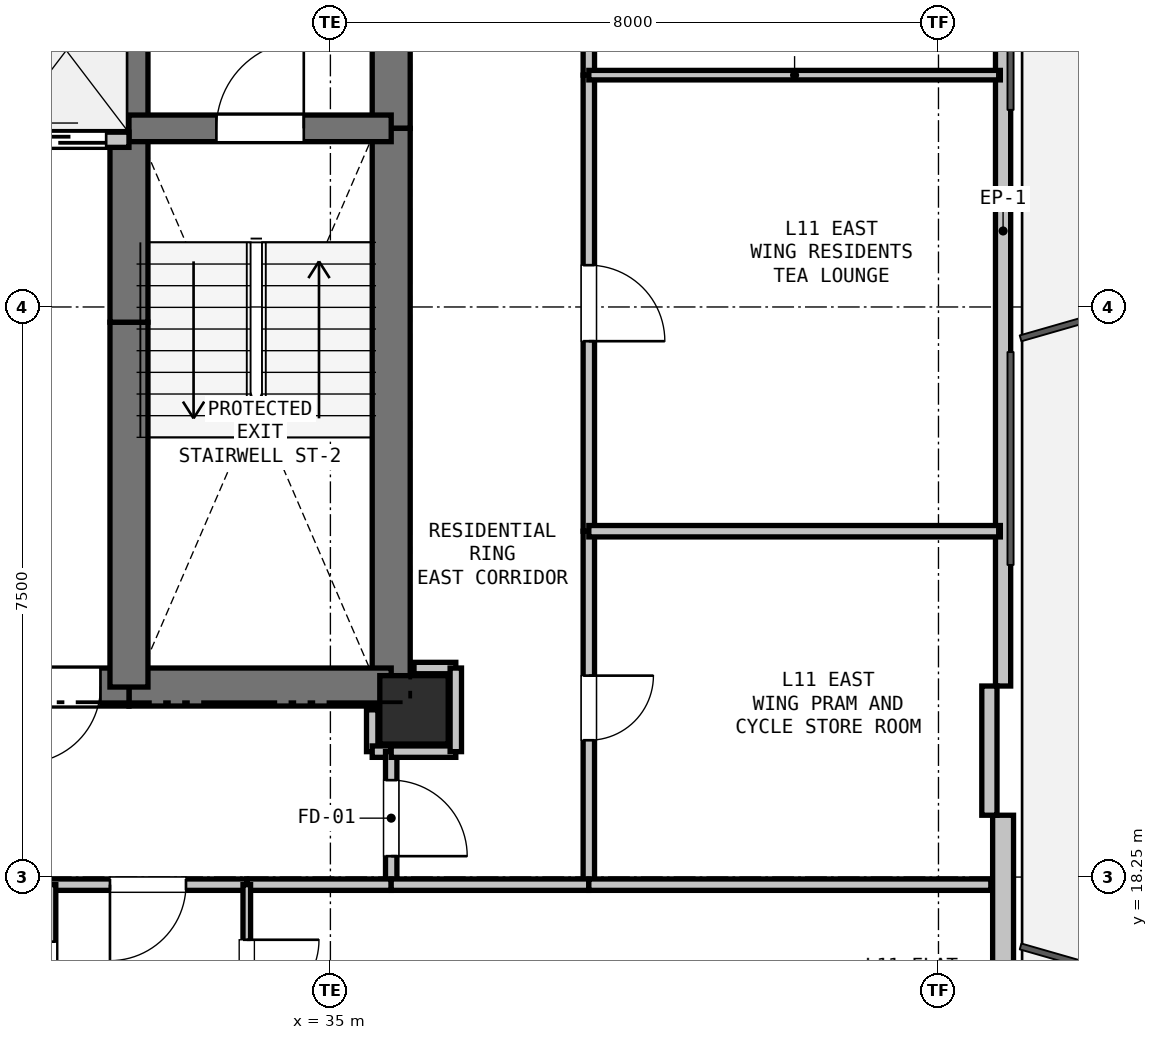
"""IFC4 building model, lengths in metres.
Left out: names, types, materials, properties, quantities, classifications, styles, units other than length and angle.
Written with IfcOpenShell. Run it as: python <this file> out.ifc"""

import sys

from ifc_helpers import new_model, si_unit, direction, frame, frame_2d, origin, origin_2d, place, context, subcontext, project, spatial, rectangle, extrude, element, fill, save


model = new_model("IFC4")
c1 = context("Model", 3, precision=1e-05, world=origin(), true_north=direction((0.0, 1.0)))
c2 = subcontext(c1, "Body", "Model", "MODEL_VIEW")
j1 = project(units=[si_unit("LENGTHUNIT", "METRE"), si_unit("PLANEANGLEUNIT", "RADIAN")], contexts=[c1])
p1 = place(None, origin())
s1 = spatial("IfcSite", under=j1, at=p1, CompositionType="ELEMENT")
p2 = place(p1, origin())
s2 = spatial("IfcBuilding", under=s1, at=p2, CompositionType="ELEMENT")
p3 = place(p2, frame((0.0, 0.0, 42.3)))
s3 = spatial("IfcBuildingStorey", under=s2, at=p3, CompositionType="ELEMENT", Elevation=42.3)
p4 = place(p3, frame((36.1, 20.45, 0.0), z_axis=(0.0, 0.0, 1.0), x_axis=(1.0, 0.0, 0.0)))
e1 = element("IfcColumn", 1, at=p4, inside=s3, PredefinedType="COLUMN", context=c2, shape_type="SweptSolid", body=[
    extrude(rectangle(XDim=0.9, YDim=0.9, at=origin_2d()), origin(), (0.0, 0.0, 1.0), 3.3),
])
p5 = place(p3, frame((43.85, 32.737, 0.0), z_axis=(0.0, 0.0, 1.0), x_axis=(0.0, -1.0, 0.0)))
e2 = element("IfcWall", 2, at=p5, inside=s3, PredefinedType="PARAPET", context=c2, shape_type="SweptSolid", body=[
    extrude(rectangle(XDim=11.973, YDim=0.2, at=frame_2d((5.987, 0.0))), origin(), (0.0, 0.0, 1.0), 0.2),
])
p6 = place(p3, frame((43.85, 19.063, 0.0), z_axis=(0.0, 0.0, 1.0), x_axis=(0.0, -1.0, 0.0)))
e3 = element("IfcWall", 3, at=p6, inside=s3, PredefinedType="SOLIDWALL", context=c2, shape_type="SweptSolid", body=[
    extrude(rectangle(XDim=12.673, YDim=0.275, at=frame_2d((6.336, 0.0))), origin(), (0.0, 0.0, 1.0), 2.66),
])
p7 = place(p3, frame((43.67, 20.763, 0.0), z_axis=(0.0, 0.0, 1.0), x_axis=(0.0, -1.0, 0.0)))
e4 = element("IfcWall", 4, at=p7, inside=s3, PredefinedType="PARAPET", context=c2, shape_type="SweptSolid", body=[
    extrude(rectangle(XDim=1.7, YDim=0.2, at=frame_2d((0.85, 0.0))), origin(), (0.0, 0.0, 1.0), 2.66),
])
p8 = place(p3, frame((35.8, 32.75, 0.0), z_axis=(0.0, 0.0, 1.0), x_axis=(0.0, -1.0, 0.0)))
e5 = element("IfcWall", 5, at=p8, inside=s3, PredefinedType="SHEAR", context=c2, shape_type="SweptSolid", body=[
    extrude(rectangle(XDim=4.65, YDim=0.5, at=frame_2d((2.325, 0.0))), origin(), (0.0, 0.0, 1.0), 3.04),
])
p9 = place(p3, frame((35.8, 28.1, 0.0), z_axis=(0.0, 0.0, 1.0), x_axis=(0.0, -1.0, 0.0)))
e6 = element("IfcWall", 6, at=p9, inside=s3, PredefinedType="SHEAR", context=c2, shape_type="SweptSolid", body=[
    extrude(rectangle(XDim=7.35, YDim=0.5, at=frame_2d((3.675, 0.0))), origin(), (0.0, 0.0, 1.0), 3.04),
])
p10 = place(p3, frame((35.8, 20.75, 0.0), z_axis=(0.0, 0.0, 1.0), x_axis=(-1.0, 0.0, 0.0)))
e7 = element("IfcWall", 7, at=p10, inside=s3, PredefinedType="SHEAR", context=c2, shape_type="SweptSolid", body=[
    extrude(rectangle(XDim=3.45, YDim=0.5, at=frame_2d((1.725, 0.0))), origin(), (0.0, 0.0, 1.0), 3.04),
])
p11 = place(p3, frame((32.35, 20.75, 0.0), z_axis=(0.0, 0.0, 1.0), x_axis=(-1.0, 0.0, 0.0)))
e8 = element("IfcWall", 8, at=p11, inside=s3, PredefinedType="SHEAR", context=c2, shape_type="SweptSolid", body=[
    extrude(rectangle(XDim=1.75, YDim=0.5, at=frame_2d((0.875, 0.0))), origin(), (0.0, 0.0, 1.0), 3.04),
])
p12 = place(p11, frame((0.375, 0.0, 0.0)))
e9 = element("IfcOpeningElement", 9, at=p12, cuts=e8, PredefinedType="OPENING", context=c2, shape_type="SweptSolid", body=[
    extrude(rectangle(XDim=1.0, YDim=2.15, at=frame_2d((0.5, 1.075))), frame((0.0, 0.26, 0.0), z_axis=(0.0, -1.0, 0.0), x_axis=(1.0, 0.0, 0.0)), (0.0, 0.0, 1.0), 0.52),
])
p13 = place(p3, frame((32.35, 20.75, 0.0), z_axis=(0.0, 0.0, 1.0), x_axis=(0.0, 1.0, 0.0)))
e10 = element("IfcWall", 10, at=p13, inside=s3, PredefinedType="SHEAR", context=c2, shape_type="SweptSolid", body=[
    extrude(rectangle(XDim=4.8, YDim=0.5, at=frame_2d((2.4, 0.0))), origin(), (0.0, 0.0, 1.0), 3.04),
])
p14 = place(p3, frame((32.35, 25.55, 0.0), z_axis=(0.0, 0.0, 1.0), x_axis=(0.0, 1.0, 0.0)))
e11 = element("IfcWall", 11, at=p14, inside=s3, PredefinedType="SHEAR", context=c2, shape_type="SweptSolid", body=[
    extrude(rectangle(XDim=2.4, YDim=0.5, at=frame_2d((1.2, 0.0))), origin(), (0.0, 0.0, 1.0), 3.04),
])
p15 = place(p3, frame((32.35, 27.95, 0.0), z_axis=(0.0, 0.0, 1.0), x_axis=(0.0, 1.0, 0.0)))
e12 = element("IfcWall", 12, at=p15, inside=s3, PredefinedType="SHEAR", context=c2, shape_type="SweptSolid", body=[
    extrude(rectangle(XDim=2.8, YDim=0.5, at=frame_2d((1.4, 0.0))), origin(), (0.0, 0.0, 1.0), 3.04),
])
p16 = place(p3, frame((32.35, 28.1, 0.0), z_axis=(0.0, 0.0, 1.0), x_axis=(1.0, 0.0, 0.0)))
e13 = element("IfcWall", 13, at=p16, inside=s3, PredefinedType="SHEAR", context=c2, shape_type="SweptSolid", body=[
    extrude(rectangle(XDim=3.45, YDim=0.35, at=frame_2d((1.725, 0.0))), origin(), (0.0, 0.0, 1.0), 3.04),
])
p17 = place(p16, frame((1.15, 0.0, 0.0)))
e14 = element("IfcOpeningElement", 14, at=p17, cuts=e13, PredefinedType="OPENING", context=c2, shape_type="SweptSolid", body=[
    extrude(rectangle(XDim=1.15, YDim=2.15, at=frame_2d((0.575, 1.075))), frame((0.0, 0.185, 0.0), z_axis=(0.0, -1.0, 0.0), x_axis=(1.0, 0.0, 0.0)), (0.0, 0.0, 1.0), 0.37),
])
p18 = place(p3, frame((27.4, 27.95, 0.0), z_axis=(0.0, 0.0, 1.0), x_axis=(1.0, 0.0, 0.0)))
e15 = element("IfcWall", 15, at=p18, inside=s3, PredefinedType="PARTITIONING", context=c2, shape_type="SweptSolid", body=[
    extrude(rectangle(XDim=4.95, YDim=0.2, at=frame_2d((2.475, 0.0))), origin(), (0.0, 0.0, 1.0), 3.04),
])
p19 = place(p18, frame((0.25, 0.0, 0.0)))
e16 = element("IfcOpeningElement", 16, at=p19, cuts=e15, PredefinedType="OPENING", context=c2, shape_type="SweptSolid", body=[
    extrude(rectangle(XDim=1.1, YDim=2.15, at=frame_2d((0.55, 1.075))), frame((0.0, 0.11, 0.0), z_axis=(0.0, -1.0, 0.0), x_axis=(1.0, 0.0, 0.0)), (0.0, 0.0, 1.0), 0.22),
])
p20 = place(p18, frame((1.9, 0.0, 0.0)))
e17 = element("IfcOpeningElement", 17, at=p20, cuts=e15, PredefinedType="OPENING", context=c2, shape_type="SweptSolid", body=[
    extrude(rectangle(XDim=1.1, YDim=2.15, at=frame_2d((0.55, 1.075))), frame((0.0, 0.11, 0.0), z_axis=(0.0, -1.0, 0.0), x_axis=(1.0, 0.0, 0.0)), (0.0, 0.0, 1.0), 0.22),
])
p21 = place(p18, frame((3.55, 0.0, 0.0)))
e18 = element("IfcOpeningElement", 18, at=p21, cuts=e15, PredefinedType="OPENING", context=c2, shape_type="SweptSolid", body=[
    extrude(rectangle(XDim=1.1, YDim=2.15, at=frame_2d((0.55, 1.075))), frame((0.0, 0.11, 0.0), z_axis=(0.0, -1.0, 0.0), x_axis=(1.0, 0.0, 0.0)), (0.0, 0.0, 1.0), 0.22),
])
p22 = place(p3, frame((35.55, 20.45, 0.0), z_axis=(0.0, 0.0, 1.0), x_axis=(0.0, -1.0, 0.0)))
e19 = element("IfcWall", 19, at=p22, inside=s3, PredefinedType="PARTITIONING", context=c2, shape_type="SweptSolid", body=[
    extrude(rectangle(XDim=0.55, YDim=0.15, at=frame_2d((0.275, 0.0))), origin(), (0.0, 0.0, 1.0), 2.488),
])
p23 = place(p3, frame((35.55, 19.9, 0.0), z_axis=(0.0, 0.0, 1.0), x_axis=(1.0, 0.0, 0.0)))
e20 = element("IfcWall", 20, at=p23, inside=s3, PredefinedType="PARTITIONING", context=c2, shape_type="SweptSolid", body=[
    extrude(rectangle(XDim=0.25, YDim=0.15, at=frame_2d((0.125, 0.0))), origin(), (0.0, 0.0, 1.0), 3.04),
])
p24 = place(p3, frame((35.8, 19.9, 0.0), z_axis=(0.0, 0.0, 1.0), x_axis=(0.0, -1.0, 0.0)))
e21 = element("IfcWall", 21, at=p24, inside=s3, PredefinedType="PARTITIONING", context=c2, shape_type="SweptSolid", body=[
    extrude(rectangle(XDim=1.75, YDim=0.15, at=frame_2d((0.875, 0.0))), origin(), (0.0, 0.0, 1.0), 3.04),
])
p25 = place(p24, frame((0.375, 0.0, 0.0)))
e22 = element("IfcOpeningElement", 22, at=p25, cuts=e21, PredefinedType="OPENING", context=c2, shape_type="SweptSolid", body=[
    extrude(rectangle(XDim=1.0, YDim=2.15, at=frame_2d((0.5, 1.075))), frame((0.0, 0.085, 0.0), z_axis=(0.0, -1.0, 0.0), x_axis=(1.0, 0.0, 0.0)), (0.0, 0.0, 1.0), 0.17),
])
p26 = place(p3, frame((35.8, 18.15, 0.0), z_axis=(0.0, 0.0, 1.0), x_axis=(-1.0, 0.0, 0.0)))
e23 = element("IfcWall", 23, at=p26, inside=s3, PredefinedType="PARTITIONING", context=c2, shape_type="SweptSolid", body=[
    extrude(rectangle(XDim=1.9, YDim=0.15, at=frame_2d((0.95, 0.0))), origin(), (0.0, 0.0, 1.0), 3.04),
])
p27 = place(p3, frame((33.9, 18.15, 0.0), z_axis=(0.0, 0.0, 1.0), x_axis=(-1.0, 0.0, 0.0)))
e24 = element("IfcWall", 24, at=p27, inside=s3, PredefinedType="PARTITIONING", context=c2, shape_type="SweptSolid", body=[
    extrude(rectangle(XDim=2.6, YDim=0.15, at=frame_2d((1.3, 0.0))), origin(), (0.0, 0.0, 1.0), 3.04),
])
p28 = place(p27, frame((0.8, 0.0, 0.0)))
e25 = element("IfcOpeningElement", 25, at=p28, cuts=e24, PredefinedType="OPENING", context=c2, shape_type="SweptSolid", body=[
    extrude(rectangle(XDim=1.0, YDim=2.15, at=frame_2d((0.5, 1.075))), frame((0.0, 0.085, 0.0), z_axis=(0.0, -1.0, 0.0), x_axis=(1.0, 0.0, 0.0)), (0.0, 0.0, 1.0), 0.17),
])
p29 = place(p3, frame((36.65, 21.0, 0.0), z_axis=(0.0, 0.0, 1.0), x_axis=(-1.0, 0.0, 0.0)))
e26 = element("IfcWall", 26, at=p29, inside=s3, PredefinedType="PARTITIONING", context=c2, shape_type="SweptSolid", body=[
    extrude(rectangle(XDim=0.55, YDim=0.15, at=frame_2d((0.275, 0.0))), origin(), (0.0, 0.0, 1.0), 2.488),
])
p30 = place(p3, frame((38.4, 32.08, 0.0), z_axis=(0.0, 0.0, 1.0), x_axis=(0.0, -1.0, 0.0)))
e27 = element("IfcWall", 27, at=p30, inside=s3, PredefinedType="PARTITIONING", context=c2, shape_type="SweptSolid", body=[
    extrude(rectangle(XDim=3.28, YDim=0.15, at=frame_2d((1.64, 0.0))), origin(), (0.0, 0.0, 1.0), 3.04),
])
p31 = place(p30, frame((1.14, 0.0, 0.0)))
e28 = element("IfcOpeningElement", 28, at=p31, cuts=e27, PredefinedType="OPENING", context=c2, shape_type="SweptSolid", body=[
    extrude(rectangle(XDim=1.0, YDim=2.15, at=frame_2d((0.5, 1.075))), frame((0.0, 0.085, 0.0), z_axis=(0.0, -1.0, 0.0), x_axis=(1.0, 0.0, 0.0)), (0.0, 0.0, 1.0), 0.17),
])
p32 = place(p3, frame((38.4, 28.8, 0.0), z_axis=(0.0, 0.0, 1.0), x_axis=(0.0, -1.0, 0.0)))
e29 = element("IfcWall", 29, at=p32, inside=s3, PredefinedType="PARTITIONING", context=c2, shape_type="SweptSolid", body=[
    extrude(rectangle(XDim=6.0, YDim=0.15, at=frame_2d((3.0, 0.0))), origin(), (0.0, 0.0, 1.0), 3.04),
])
p33 = place(p32, frame((2.5, 0.0, 0.0)))
e30 = element("IfcOpeningElement", 30, at=p33, cuts=e29, PredefinedType="OPENING", context=c2, shape_type="SweptSolid", body=[
    extrude(rectangle(XDim=1.0, YDim=2.15, at=frame_2d((0.5, 1.075))), frame((0.0, 0.085, 0.0), z_axis=(0.0, -1.0, 0.0), x_axis=(1.0, 0.0, 0.0)), (0.0, 0.0, 1.0), 0.17),
])
p34 = place(p3, frame((38.4, 22.8, 0.0), z_axis=(0.0, 0.0, 1.0), x_axis=(0.0, -1.0, 0.0)))
e31 = element("IfcWall", 31, at=p34, inside=s3, PredefinedType="PARTITIONING", context=c2, shape_type="SweptSolid", body=[
    extrude(rectangle(XDim=4.65, YDim=0.15, at=frame_2d((2.325, 0.0))), origin(), (0.0, 0.0, 1.0), 3.04),
])
p35 = place(p34, frame((1.9, 0.0, 0.0)))
e32 = element("IfcOpeningElement", 32, at=p35, cuts=e31, PredefinedType="OPENING", context=c2, shape_type="SweptSolid", body=[
    extrude(rectangle(XDim=0.85, YDim=2.1, at=frame_2d((0.425, 1.05))), frame((0.0, 0.085, 0.0), z_axis=(0.0, -1.0, 0.0), x_axis=(1.0, 0.0, 0.0)), (0.0, 0.0, 1.0), 0.17),
])
p36 = place(p3, frame((38.4, 18.15, 0.0), z_axis=(0.0, 0.0, 1.0), x_axis=(-1.0, 0.0, 0.0)))
e33 = element("IfcWall", 33, at=p36, inside=s3, PredefinedType="PARTITIONING", context=c2, shape_type="SweptSolid", body=[
    extrude(rectangle(XDim=2.6, YDim=0.15, at=frame_2d((1.3, 0.0))), origin(), (0.0, 0.0, 1.0), 2.337),
])
p37 = place(p3, frame((35.8, 19.9, 0.0), z_axis=(0.0, 0.0, 1.0), x_axis=(1.0, 0.0, 0.0)))
e34 = element("IfcWall", 34, at=p37, inside=s3, PredefinedType="PARTITIONING", context=c2, shape_type="SweptSolid", body=[
    extrude(rectangle(XDim=0.85, YDim=0.15, at=frame_2d((0.425, 0.0))), origin(), (0.0, 0.0, 1.0), 2.337),
])
p38 = place(p3, frame((36.65, 19.9, 0.0), z_axis=(0.0, 0.0, 1.0), x_axis=(0.0, 1.0, 0.0)))
e35 = element("IfcWall", 35, at=p38, inside=s3, PredefinedType="PARTITIONING", context=c2, shape_type="SweptSolid", body=[
    extrude(rectangle(XDim=1.1, YDim=0.15, at=frame_2d((0.55, 0.0))), origin(), (0.0, 0.0, 1.0), 3.04),
])
p39 = place(p3, frame((31.3, 15.75, 0.0), z_axis=(0.0, 0.0, 1.0), x_axis=(0.0, 1.0, 0.0)))
e36 = element("IfcWall", 36, at=p39, inside=s3, PredefinedType="PLUMBINGWALL", context=c2, shape_type="SweptSolid", body=[
    extrude(rectangle(XDim=2.4, YDim=0.175, at=frame_2d((1.2, 0.0))), origin(), (0.0, 0.0, 1.0), 3.04),
])
p40 = place(p39, frame((0.75, 0.0, 0.0)))
e37 = element("IfcOpeningElement", 37, at=p40, cuts=e36, PredefinedType="OPENING", context=c2, shape_type="SweptSolid", body=[
    extrude(rectangle(XDim=0.9, YDim=2.1, at=frame_2d((0.45, 1.05))), frame((0.0, 0.097, 0.0), z_axis=(0.0, -1.0, 0.0), x_axis=(1.0, 0.0, 0.0)), (0.0, 0.0, 1.0), 0.195),
])
p41 = place(p3, frame((33.9, 18.15, 0.0), z_axis=(0.0, 0.0, 1.0), x_axis=(0.0, -1.0, 0.0)))
e38 = element("IfcWall", 38, at=p41, inside=s3, PredefinedType="PARTITIONING", context=c2, shape_type="SweptSolid", body=[
    extrude(rectangle(XDim=2.4, YDim=0.1, at=frame_2d((1.2, 0.0))), origin(), (0.0, 0.0, 1.0), 3.04),
])
p42 = place(p41, frame((0.725, 0.0, 0.0)))
e39 = element("IfcOpeningElement", 39, at=p42, cuts=e38, PredefinedType="OPENING", context=c2, shape_type="SweptSolid", body=[
    extrude(rectangle(XDim=0.95, YDim=2.1, at=frame_2d((0.475, 1.05))), frame((0.0, 0.06, 0.0), z_axis=(0.0, -1.0, 0.0), x_axis=(1.0, 0.0, 0.0)), (0.0, 0.0, 1.0), 0.12),
])
p43 = place(p3, frame((38.4, 18.15, 0.0), z_axis=(0.0, 0.0, 1.0), x_axis=(1.0, 0.0, 0.0)))
e40 = element("IfcWall", 40, at=p43, inside=s3, PredefinedType="PARTITIONING", context=c2, shape_type="SweptSolid", body=[
    extrude(rectangle(XDim=5.289, YDim=0.15, at=frame_2d((2.644, 0.0))), origin(), (0.0, 0.0, 1.0), 2.365),
])
p44 = place(p3, frame((43.814, 28.8, 0.0), z_axis=(0.0, 0.0, 1.0), x_axis=(-1.0, 0.0, 0.0)))
e41 = element("IfcWall", 41, at=p44, inside=s3, PredefinedType="PARTITIONING", context=c2, shape_type="SweptSolid", body=[
    extrude(rectangle(XDim=5.414, YDim=0.125, at=frame_2d((2.707, 0.0))), origin(), (0.0, 0.0, 1.0), 2.365),
])
p45 = place(p3, frame((43.814, 22.8, 0.0), z_axis=(0.0, 0.0, 1.0), x_axis=(-1.0, 0.0, 0.0)))
e42 = element("IfcWall", 42, at=p45, inside=s3, PredefinedType="PARTITIONING", context=c2, shape_type="SweptSolid", body=[
    extrude(rectangle(XDim=5.414, YDim=0.15, at=frame_2d((2.707, 0.0))), origin(), (0.0, 0.0, 1.0), 2.365),
])
p46 = place(p21, origin())
e43 = element("IfcDoor", 43, at=p46, inside=s3, OperationType="SLIDING_TO_LEFT", PredefinedType="DOOR", context=c2, shape_type="SweptSolid", body=[
    extrude(rectangle(XDim=1.1, YDim=2.15, at=frame_2d((0.55, 1.075))), frame((0.0, 0.025, 0.0), z_axis=(0.0, -1.0, 0.0), x_axis=(1.0, 0.0, 0.0)), (0.0, 0.0, 1.0), 0.05),
])
fill(e18, e43)
p47 = place(p12, origin())
e44 = element("IfcDoor", 44, at=p47, inside=s3, OperationType="SINGLE_SWING_RIGHT", PredefinedType="DOOR", context=c2, shape_type="SweptSolid", body=[
    extrude(rectangle(XDim=1.0, YDim=2.15, at=frame_2d((0.5, 1.075))), frame((0.0, 0.025, 0.0), z_axis=(0.0, -1.0, 0.0), x_axis=(1.0, 0.0, 0.0)), (0.0, 0.0, 1.0), 0.05),
])
fill(e9, e44)
p48 = place(p17, origin())
e45 = element("IfcDoor", 45, at=p48, inside=s3, OperationType="SINGLE_SWING_RIGHT", PredefinedType="DOOR", context=c2, shape_type="SweptSolid", body=[
    extrude(rectangle(XDim=1.15, YDim=2.15, at=frame_2d((0.575, 1.075))), frame((0.0, 0.025, 0.0), z_axis=(0.0, -1.0, 0.0), x_axis=(1.0, 0.0, 0.0)), (0.0, 0.0, 1.0), 0.05),
])
fill(e14, e45)
p49 = place(p25, origin())
e46 = element("IfcDoor", 46, at=p49, inside=s3, OperationType="SINGLE_SWING_RIGHT", PredefinedType="DOOR", context=c2, shape_type="SweptSolid", body=[
    extrude(rectangle(XDim=1.0, YDim=2.15, at=frame_2d((0.5, 1.075))), frame((0.0, 0.025, 0.0), z_axis=(0.0, -1.0, 0.0), x_axis=(1.0, 0.0, 0.0)), (0.0, 0.0, 1.0), 0.05),
])
fill(e22, e46)
p50 = place(p28, origin())
e47 = element("IfcDoor", 47, at=p50, inside=s3, OperationType="SINGLE_SWING_RIGHT", PredefinedType="DOOR", context=c2, shape_type="SweptSolid", body=[
    extrude(rectangle(XDim=1.0, YDim=2.15, at=frame_2d((0.5, 1.075))), frame((0.0, 0.025, 0.0), z_axis=(0.0, -1.0, 0.0), x_axis=(1.0, 0.0, 0.0)), (0.0, 0.0, 1.0), 0.05),
])
fill(e25, e47)
p51 = place(p33, origin())
e48 = element("IfcDoor", 48, at=p51, inside=s3, OperationType="SINGLE_SWING_RIGHT", PredefinedType="DOOR", context=c2, shape_type="SweptSolid", body=[
    extrude(rectangle(XDim=1.0, YDim=2.15, at=frame_2d((0.5, 1.075))), frame((0.0, 0.025, 0.0), z_axis=(0.0, -1.0, 0.0), x_axis=(1.0, 0.0, 0.0)), (0.0, 0.0, 1.0), 0.05),
])
fill(e30, e48)
p52 = place(p35, origin())
e49 = element("IfcDoor", 49, at=p52, inside=s3, OperationType="SINGLE_SWING_LEFT", PredefinedType="DOOR", context=c2, shape_type="SweptSolid", body=[
    extrude(rectangle(XDim=0.85, YDim=2.1, at=frame_2d((0.425, 1.05))), frame((0.0, 0.025, 0.0), z_axis=(0.0, -1.0, 0.0), x_axis=(1.0, 0.0, 0.0)), (0.0, 0.0, 1.0), 0.05),
])
fill(e32, e49)
p53 = place(p42, origin())
e50 = element("IfcDoor", 50, at=p53, inside=s3, OperationType="SINGLE_SWING_LEFT", PredefinedType="DOOR", context=c2, shape_type="SweptSolid", body=[
    extrude(rectangle(XDim=0.95, YDim=2.1, at=frame_2d((0.475, 1.05))), frame((0.0, 0.025, 0.0), z_axis=(0.0, -1.0, 0.0), x_axis=(1.0, 0.0, 0.0)), (0.0, 0.0, 1.0), 0.05),
])
fill(e39, e50)
save(model, sys.argv[1])
